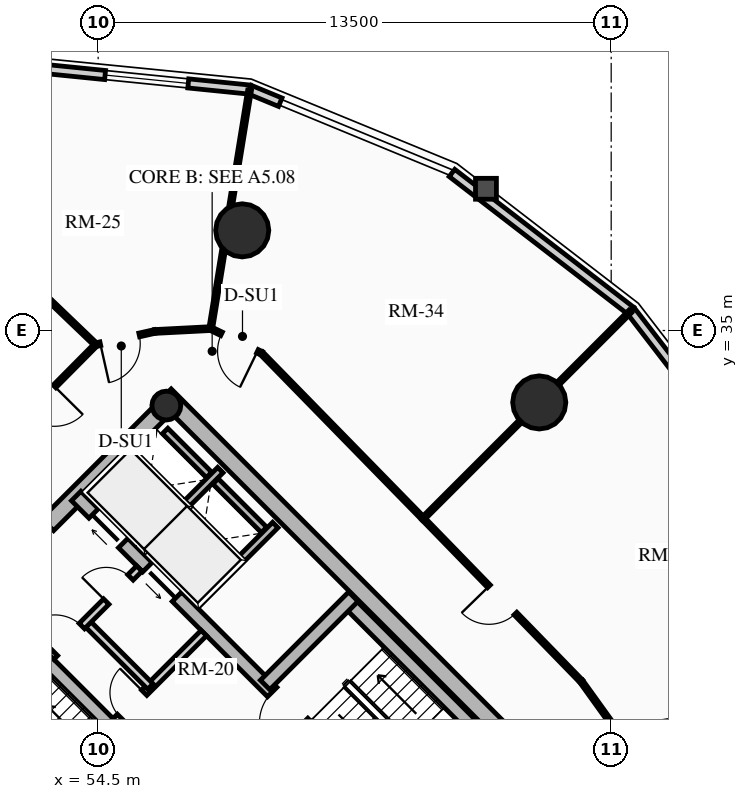
"""IFC4 building model, lengths in metres.
Left out: names, types, materials, properties, quantities, classifications, styles, units other than length and angle.
Written with IfcOpenShell. Run it as: python <this file> out.ifc"""

import sys

from ifc_helpers import new_model, si_unit, direction, frame, frame_2d, origin, origin_2d, place, context, subcontext, project, spatial, rectangle, circle, hollow_circle, extrude, source, transform, mapped, element, fill, save


model = new_model("IFC4")
c1 = context("Model", 3, precision=1e-05, world=origin(), true_north=direction((0.0, 1.0)))
c2 = subcontext(c1, "Body", "Model", "MODEL_VIEW")
j1 = project(units=[si_unit("LENGTHUNIT", "METRE"), si_unit("PLANEANGLEUNIT", "RADIAN")], contexts=[c1])
p1 = place(None, origin())
s1 = spatial("IfcSite", under=j1, at=p1, CompositionType="ELEMENT")
p2 = place(p1, origin())
s2 = spatial("IfcBuilding", under=s1, at=p2, CompositionType="ELEMENT")
p3 = place(p2, frame((0.0, 0.0, 99.25)))
s3 = spatial("IfcBuildingStorey", under=s2, at=p3, CompositionType="ELEMENT", Elevation=99.25)
for number, where, z_axis, x_axis in (
    (1, (58.737, 15.697, 0.0), (0.0, 0.0, 1.0), (-0.707, 0.707, 0.0)),
    (2, (66.303, 23.263, 0.0), (0.0, 0.0, 1.0), (-0.707, 0.707, 0.0)),
):
    element("IfcWall", number, at=place(p3, frame(where, z_axis=z_axis, x_axis=x_axis)), inside=s3, PredefinedType="SHEAR", context=c2, shape_type="SweptSolid", body=[
        extrude(rectangle(XDim=14.2, YDim=0.45, at=frame_2d((7.1, 0.0))), origin(), (0.0, 0.0, 1.0), 2.91),
    ])
p4 = place(p3, frame((48.856, 25.578, 0.0), z_axis=(0.0, 0.0, 1.0), x_axis=(0.707106781187, 0.707106781187, 0.0)))
e3 = element("IfcWall", 3, at=p4, inside=s3, PredefinedType="SHEAR", context=c2, shape_type="SweptSolid", body=[
    extrude(rectangle(XDim=10.7, YDim=0.45, at=frame_2d((5.35, 0.0))), origin(), (0.0, 0.0, 1.0), 2.91),
])
m1 = source(origin(), c2, "Body", "SweptSolid", [
    extrude(rectangle(XDim=1.5, YDim=2.02, at=frame_2d((0.75, 1.01))), frame((0.0, 0.235, 0.0), z_axis=(0.0, -1.0, 0.0), x_axis=(1.0, 0.0, 0.0)), (0.0, 0.0, 1.0), 0.47),
])
p5 = place(p4, frame((4.6, 0.0, 0.0)))
e4 = element("IfcOpeningElement", 4, at=p5, cuts=e3, PredefinedType="OPENING", context=c2, shape_type="MappedRepresentation", body=[
    mapped(m1, transform((0.0, 0.0, 0.0), x_axis=(1.0, 0.0, 0.0), y_axis=(0.0, 1.0, 0.0), z_axis=(0.0, 0.0, 1.0), scale=1.0)),
])
p6 = place(p3, frame((61.078, 18.355, 0.0), z_axis=(0.0, 0.0, 1.0), x_axis=(-0.707106781187, 0.707106781187, 0.0)))
e5 = element("IfcWall", 5, at=p6, inside=s3, PredefinedType="SHEAR", context=c2, shape_type="SweptSolid", body=[
    extrude(rectangle(XDim=13.75, YDim=0.35, at=frame_2d((6.875, 0.0))), origin(), (0.0, 0.0, 1.0), 2.91),
])
m2 = source(origin(), c2, "Body", "SweptSolid", [
    extrude(rectangle(XDim=1.1, YDim=2.015, at=frame_2d((0.55, 1.007))), frame((0.0, 0.185, 0.0), z_axis=(0.0, -1.0, 0.0), x_axis=(1.0, 0.0, 0.0)), (0.0, 0.0, 1.0), 0.37),
])
p7 = place(p6, frame((4.875, 0.0, 0.0)))
e6 = element("IfcOpeningElement", 6, at=p7, cuts=e5, PredefinedType="OPENING", context=c2, shape_type="MappedRepresentation", body=[
    mapped(m2, transform((0.0, 0.0, 0.0), x_axis=(1.0, 0.0, 0.0), y_axis=(0.0, 1.0, 0.0), z_axis=(0.0, 0.0, 1.0), scale=1.0)),
])
m3 = source(origin(), c2, "Body", "SweptSolid", [
    extrude(rectangle(XDim=1.15, YDim=2.02, at=frame_2d((0.575, 1.01))), frame((0.0, 0.185, 0.0), z_axis=(0.0, -1.0, 0.0), x_axis=(1.0, 0.0, 0.0)), (0.0, 0.0, 1.0), 0.37),
])
p8 = place(p6, frame((7.295, 0.0, 0.0)))
e7 = element("IfcOpeningElement", 7, at=p8, cuts=e5, PredefinedType="OPENING", context=c2, shape_type="MappedRepresentation", body=[
    mapped(m3, transform((0.0, 0.0, 0.0), x_axis=(1.0, 0.0, 0.0), y_axis=(0.0, 1.0, 0.0), z_axis=(0.0, 0.0, 1.0), scale=1.0)),
])
p9 = place(p3, frame((63.645, 20.922, 0.0), z_axis=(0.0, 0.0, 1.0), x_axis=(-0.707106781187, 0.707106781187, 0.0)))
e8 = element("IfcWall", 8, at=p9, inside=s3, PredefinedType="SHEAR", context=c2, shape_type="SweptSolid", body=[
    extrude(rectangle(XDim=13.75, YDim=0.35, at=frame_2d((6.875, 0.0))), origin(), (0.0, 0.0, 1.0), 2.91),
])
p10 = place(p9, frame((10.0, 0.0, 0.0)))
e9 = element("IfcOpeningElement", 9, at=p10, cuts=e8, PredefinedType="OPENING", context=c2, shape_type="MappedRepresentation", body=[
    mapped(m2, transform((0.0, 0.0, 0.0), x_axis=(1.0, 0.0, 0.0), y_axis=(0.0, 1.0, 0.0), z_axis=(0.0, 0.0, 1.0), scale=1.0)),
])
p11 = place(p9, frame((12.0, 0.0, 0.0)))
e10 = element("IfcOpeningElement", 10, at=p11, cuts=e8, PredefinedType="OPENING", context=c2, shape_type="MappedRepresentation", body=[
    mapped(m2, transform((0.0, 0.0, 0.0), x_axis=(1.0, 0.0, 0.0), y_axis=(0.0, 1.0, 0.0), z_axis=(0.0, 0.0, 1.0), scale=1.0)),
])
p12 = place(p9, frame((5.305, 0.0, 0.0)))
e11 = element("IfcOpeningElement", 11, at=p12, cuts=e8, PredefinedType="OPENING", context=c2, shape_type="MappedRepresentation", body=[
    mapped(m3, transform((0.0, 0.0, 0.0), x_axis=(1.0, 0.0, 0.0), y_axis=(0.0, 1.0, 0.0), z_axis=(0.0, 0.0, 1.0), scale=1.0)),
])
for number, where, z_axis, x_axis in (
    (12, (53.922, 21.141, 0.0), (0.0, 0.0, 1.0), (-0.707, 0.707, 0.0)),
    (13, (65.83, 23.107, 0.0), (0.0, 0.0, 1.0), (-0.707, 0.707, 0.0)),
):
    element("IfcWall", number, at=place(p3, frame(where, z_axis=z_axis, x_axis=x_axis)), inside=s3, PredefinedType="SHEAR", context=c2, shape_type="SweptSolid", body=[
        extrude(rectangle(XDim=6.72, YDim=0.35, at=frame_2d((3.36, 0.0))), origin(), (0.0, 0.0, 1.0), 2.91),
    ])
p13 = place(p3, frame((58.893, 25.674, 0.0), z_axis=(0.0, 0.0, 1.0), x_axis=(0.707106781187, 0.707106781187, 0.0)))
e14 = element("IfcWall", 14, at=p13, inside=s3, PredefinedType="SHEAR", context=c2, shape_type="SweptSolid", body=[
    extrude(rectangle(XDim=3.285, YDim=0.35, at=frame_2d((1.643, 0.0))), origin(), (0.0, 0.0, 1.0), 2.91),
])
p14 = place(p3, frame((56.294, 33.024, 0.0), z_axis=(0.0, 0.0, 1.0), x_axis=(0.707106781187, 0.707106781187, 0.0)))
e15 = element("IfcColumn", 15, at=p14, inside=s3, PredefinedType="COLUMN", context=c2, shape_type="SweptSolid", body=[
    extrude(hollow_circle(Radius=0.38, WallThickness=0.032, at=origin_2d()), origin(), (0.0, 0.0, 1.0), 2.91),
])
for number, where, z_axis, x_axis in (
    (16, (66.107, 33.107, 0.0), (0.0, 0.0, 1.0), (1.0, 0.0, 0.0)),
    (17, (58.291, 37.635, 0.0), (0.0, 0.0, 1.0), (1.0, 0.0, 0.0)),
):
    element("IfcColumn", number, at=place(p3, frame(where, z_axis=z_axis, x_axis=x_axis)), inside=s3, PredefinedType="USERDEFINED", context=c2, shape_type="SweptSolid", body=[
        extrude(circle(Radius=0.7, at=origin_2d()), origin(), (0.0, 0.0, 1.0), 2.91),
    ])
p15 = place(p3, frame((63.811, 39.145, 0.0), z_axis=(0.0, 0.0, 1.0), x_axis=(0.791982052206, -0.61054437102, 0.0)))
e18 = element("IfcWall", 18, at=p15, inside=s3, PredefinedType="SOLIDWALL", context=c2, shape_type="SweptSolid", body=[
    extrude(rectangle(XDim=5.942, YDim=0.24, at=frame_2d((2.971, 0.0))), origin(), (0.0, 0.0, 1.0), 2.179),
])
p16 = place(p3, frame((58.487, 41.339, 0.0), z_axis=(0.0, 0.0, 1.0), x_axis=(0.924556017656, -0.381046152345, 0.0)))
e19 = element("IfcWall", 19, at=p16, inside=s3, PredefinedType="SOLIDWALL", context=c2, shape_type="SweptSolid", body=[
    extrude(rectangle(XDim=0.87, YDim=0.24, at=frame_2d((0.435, 0.0))), origin(), (0.0, 0.0, 1.0), 2.179),
])
p17 = place(p3, frame((53.067, 41.885, 0.0), z_axis=(0.0, 0.0, 1.0), x_axis=(0.994971754311, -0.10015591906, 0.0)))
e20 = element("IfcWall", 20, at=p17, inside=s3, PredefinedType="SOLIDWALL", context=c2, shape_type="SweptSolid", body=[
    extrude(rectangle(XDim=5.448, YDim=0.24, at=frame_2d((2.724, 0.0))), origin(), (0.0, 0.0, 1.0), 2.179),
])
m4 = source(origin(), c2, "Body", "SweptSolid", [
    extrude(rectangle(XDim=2.2, YDim=1.35, at=frame_2d((1.1, 0.675))), frame((0.0, 0.13, 0.0), z_axis=(0.0, -1.0, 0.0), x_axis=(1.0, 0.0, 0.0)), (0.0, 0.0, 1.0), 0.26),
])
p18 = place(p17, frame((1.624, 0.0, 0.65)))
e21 = element("IfcOpeningElement", 21, at=p18, cuts=e20, PredefinedType="OPENING", context=c2, shape_type="MappedRepresentation", body=[
    mapped(m4, transform((0.0, 0.0, 0.0), x_axis=(1.0, 0.0, 0.0), y_axis=(0.0, 1.0, 0.0), z_axis=(0.0, 0.0, 1.0), scale=1.0)),
])
p19 = place(p3, frame((68.517, 35.517, 0.0), z_axis=(0.0, 0.0, 1.0), x_axis=(0.61054437102, -0.791982052206, 0.0)))
e22 = element("IfcWall", 22, at=p19, inside=s3, PredefinedType="SOLIDWALL", context=c2, shape_type="SweptSolid", body=[
    extrude(rectangle(XDim=5.942, YDim=0.24, at=frame_2d((2.971, 0.0))), origin(), (0.0, 0.0, 1.0), 2.179),
])
m5 = source(origin(), c2, "Body", "SweptSolid", [
    extrude(rectangle(XDim=1.9, YDim=1.35, at=frame_2d((0.95, 0.675))), frame((0.0, 0.13, 0.0), z_axis=(0.0, -1.0, 0.0), x_axis=(1.0, 0.0, 0.0)), (0.0, 0.0, 1.0), 0.26),
])
p20 = place(p19, frame((2.021, 0.0, 0.65)))
e23 = element("IfcOpeningElement", 23, at=p20, cuts=e22, PredefinedType="OPENING", context=c2, shape_type="MappedRepresentation", body=[
    mapped(m5, transform((0.0, 0.0, 0.0), x_axis=(1.0, 0.0, 0.0), y_axis=(0.0, 1.0, 0.0), z_axis=(0.0, 0.0, 1.0), scale=1.0)),
])
p21 = place(p3, frame((57.062, 27.781, 0.0), z_axis=(0.0, 0.0, 1.0), x_axis=(0.707106781187, 0.707106781187, 0.0)))
e24 = element("IfcWall", 24, at=p21, inside=s3, PredefinedType="SHEAR", context=c2, shape_type="SweptSolid", body=[
    extrude(rectangle(XDim=2.97, YDim=0.2, at=frame_2d((1.485, 0.0))), origin(), (0.0, 0.0, 1.0), 2.91),
])
p22 = place(p3, frame((55.615, 29.227, 0.0), z_axis=(0.0, 0.0, 1.0), x_axis=(0.707147878904, 0.70706568108, 0.0)))
e25 = element("IfcWall", 25, at=p22, inside=s3, PredefinedType="SHEAR", context=c2, shape_type="SweptSolid", body=[
    extrude(rectangle(XDim=2.97, YDim=0.2, at=frame_2d((1.485, 0.0))), origin(), (0.0, 0.0, 1.0), 2.91),
])
p23 = place(p3, frame((58.865, 29.754, 0.0), z_axis=(0.0, 0.0, 1.0), x_axis=(-0.707174411312, 0.707039144592, 0.0)))
e26 = element("IfcWall", 26, at=p23, inside=s3, PredefinedType="SHEAR", context=c2, shape_type="SweptSolid", body=[
    extrude(rectangle(XDim=1.805, YDim=0.2, at=frame_2d((0.902, 0.0))), origin(), (0.0, 0.0, 1.0), 2.91),
])
p24 = place(p3, frame((57.419, 31.2, 0.0), z_axis=(0.0, 0.0, 1.0), x_axis=(-0.707032117043, 0.707181437447, 0.0)))
e27 = element("IfcWall", 27, at=p24, inside=s3, PredefinedType="SHEAR", context=c2, shape_type="SweptSolid", body=[
    extrude(rectangle(XDim=1.635, YDim=0.2, at=frame_2d((0.817, 0.0))), origin(), (0.0, 0.0, 1.0), 2.91),
])
p25 = place(p3, frame((54.961, 24.719, 0.0), z_axis=(0.0, 0.0, 1.0), x_axis=(0.707106781187, 0.707106781187, 0.0)))
e28 = element("IfcWall", 28, at=p25, inside=s3, PredefinedType="PARTITIONING", context=c2, shape_type="SweptSolid", body=[
    extrude(rectangle(XDim=3.28, YDim=0.2, at=frame_2d((1.64, 0.0))), origin(), (0.0, 0.0, 1.0), 2.655),
])
m6 = source(origin(), c2, "Body", "SweptSolid", [
    extrude(rectangle(XDim=0.9, YDim=2.005, at=frame_2d((0.45, 1.002))), frame((0.0, 0.11, 0.0), z_axis=(0.0, -1.0, 0.0), x_axis=(1.0, 0.0, 0.0)), (0.0, 0.0, 1.0), 0.22),
])
p26 = place(p25, frame((0.16, 0.0, 0.0)))
e29 = element("IfcOpeningElement", 29, at=p26, cuts=e28, PredefinedType="OPENING", context=c2, shape_type="MappedRepresentation", body=[
    mapped(m6, transform((0.0, 0.0, 0.0), x_axis=(1.0, 0.0, 0.0), y_axis=(0.0, 1.0, 0.0), z_axis=(0.0, 0.0, 1.0), scale=1.0)),
])
p27 = place(p3, frame((55.874, 25.631, 0.0), z_axis=(0.0, 0.0, 1.0), x_axis=(-0.707157639372, 0.707055919343, 0.0)))
e30 = element("IfcWall", 30, at=p27, inside=s3, PredefinedType="PARTITIONING", context=c2, shape_type="SweptSolid", body=[
    extrude(rectangle(XDim=2.4, YDim=0.2, at=frame_2d((1.2, 0.0))), origin(), (0.0, 0.0, 1.0), 2.655),
])
p28 = place(p3, frame((53.264, 26.416, 0.0), z_axis=(0.0, 0.0, 1.0), x_axis=(0.707106781187, 0.707106781187, 0.0)))
e31 = element("IfcWall", 31, at=p28, inside=s3, PredefinedType="PARTITIONING", context=c2, shape_type="SweptSolid", body=[
    extrude(rectangle(XDim=3.28, YDim=0.2, at=frame_2d((1.64, 0.0))), origin(), (0.0, 0.0, 1.0), 2.655),
])
m7 = source(origin(), c2, "Body", "SweptSolid", [
    extrude(rectangle(XDim=1.0, YDim=2.015, at=frame_2d((0.5, 1.007))), frame((0.0, 0.11, 0.0), z_axis=(0.0, -1.0, 0.0), x_axis=(1.0, 0.0, 0.0)), (0.0, 0.0, 1.0), 0.22),
])
p29 = place(p28, frame((0.14, 0.0, 0.0)))
e32 = element("IfcOpeningElement", 32, at=p29, cuts=e31, PredefinedType="OPENING", context=c2, shape_type="MappedRepresentation", body=[
    mapped(m7, transform((0.0, 0.0, 0.0), x_axis=(1.0, 0.0, 0.0), y_axis=(0.0, 1.0, 0.0), z_axis=(0.0, 0.0, 1.0), scale=1.0)),
])
p30 = place(p28, frame((2.05, 0.0, 0.0)))
e33 = element("IfcOpeningElement", 33, at=p30, cuts=e31, PredefinedType="OPENING", context=c2, shape_type="MappedRepresentation", body=[
    mapped(m6, transform((0.0, 0.0, 0.0), x_axis=(1.0, 0.0, 0.0), y_axis=(0.0, 1.0, 0.0), z_axis=(0.0, 0.0, 1.0), scale=1.0)),
])
p31 = place(p3, frame((63.051, 30.051, 0.0), z_axis=(0.0, 0.0, 1.0), x_axis=(-0.698911483116, 0.715208178622, 0.0)))
e34 = element("IfcWall", 34, at=p31, inside=s3, PredefinedType="MOVABLE", context=c2, shape_type="SweptSolid", body=[
    extrude(rectangle(XDim=6.082, YDim=0.1, at=frame_2d((3.041, 0.0))), origin(), (0.0, 0.0, 1.0), 2.225),
])
p32 = place(p3, frame((58.8, 34.401, 0.0), z_axis=(0.0, 0.0, 1.0), x_axis=(-0.899620612635, 0.436672363818, 0.0)))
e35 = element("IfcWall", 35, at=p32, inside=s3, PredefinedType="MOVABLE", context=c2, shape_type="SweptSolid", body=[
    extrude(rectangle(XDim=1.487, YDim=0.1, at=frame_2d((0.743, 0.0))), origin(), (0.0, 0.0, 1.0), 2.225),
])
m8 = source(origin(), c2, "Body", "SweptSolid", [
    extrude(rectangle(XDim=1.05, YDim=2.015, at=frame_2d((0.525, 1.007))), frame((0.0, 0.06, 0.0), z_axis=(0.0, -1.0, 0.0), x_axis=(1.0, 0.0, 0.0)), (0.0, 0.0, 1.0), 0.12),
])
p33 = place(p32, frame((0.12, 0.0, 0.0)))
e36 = element("IfcOpeningElement", 36, at=p33, cuts=e35, PredefinedType="OPENING", context=c2, shape_type="MappedRepresentation", body=[
    mapped(m8, transform((0.0, 0.0, 0.0), x_axis=(1.0, 0.0, 0.0), y_axis=(0.0, 1.0, 0.0), z_axis=(0.0, 0.0, 1.0), scale=1.0)),
])
p34 = place(p3, frame((57.462, 35.05, 0.0), z_axis=(0.0, 0.0, 1.0), x_axis=(-0.998677016607, -0.051421945723, 0.0)))
e37 = element("IfcWall", 37, at=p34, inside=s3, PredefinedType="MOVABLE", context=c2, shape_type="SweptSolid", body=[
    extrude(rectangle(XDim=1.477, YDim=0.1, at=frame_2d((0.738, 0.0))), origin(), (0.0, 0.0, 1.0), 2.225),
])
p35 = place(p3, frame((55.988, 34.974, 0.0), z_axis=(0.0, 0.0, 1.0), x_axis=(-0.975666565154, -0.219259557695, 0.0)))
e38 = element("IfcWall", 38, at=p35, inside=s3, PredefinedType="MOVABLE", context=c2, shape_type="SweptSolid", body=[
    extrude(rectangle(XDim=1.587, YDim=0.1, at=frame_2d((0.793, 0.0))), origin(), (0.0, 0.0, 1.0), 2.225),
])
p36 = place(p35, frame((0.417, 0.0, 0.0)))
e39 = element("IfcOpeningElement", 39, at=p36, cuts=e38, PredefinedType="OPENING", context=c2, shape_type="MappedRepresentation", body=[
    mapped(m8, transform((0.0, 0.0, 0.0), x_axis=(1.0, 0.0, 0.0), y_axis=(0.0, 1.0, 0.0), z_axis=(0.0, 0.0, 1.0), scale=1.0)),
])
p37 = place(p3, frame((54.44, 34.626, 0.0), z_axis=(0.0, 0.0, 1.0), x_axis=(-0.703978840546, -0.710220945948, 0.0)))
e40 = element("IfcWall", 40, at=p37, inside=s3, PredefinedType="MOVABLE", context=c2, shape_type="SweptSolid", body=[
    extrude(rectangle(XDim=3.364, YDim=0.1, at=frame_2d((1.682, 0.0))), origin(), (0.0, 0.0, 1.0), 2.225),
])
p38 = place(p37, frame((1.546, 0.0, 0.0)))
e41 = element("IfcOpeningElement", 41, at=p38, cuts=e40, PredefinedType="OPENING", context=c2, shape_type="MappedRepresentation", body=[
    mapped(m8, transform((0.0, 0.0, 0.0), x_axis=(1.0, 0.0, 0.0), y_axis=(0.0, 1.0, 0.0), z_axis=(0.0, 0.0, 1.0), scale=1.0)),
])
p39 = place(p3, frame((68.15, 24.465, 0.0), z_axis=(0.0, 0.0, 1.0), x_axis=(-0.58376767291, 0.811920749868, 0.0)))
e42 = element("IfcWall", 42, at=p39, inside=s3, PredefinedType="MOVABLE", context=c2, shape_type="SweptSolid", body=[
    extrude(rectangle(XDim=1.605, YDim=0.1, at=frame_2d((0.803, 0.0))), origin(), (0.0, 0.0, 1.0), 2.225),
])
p40 = place(p3, frame((67.213, 25.768, 0.0), z_axis=(0.0, 0.0, 1.0), x_axis=(-0.696916079748, 0.717152687918, 0.0)))
e43 = element("IfcWall", 43, at=p40, inside=s3, PredefinedType="MOVABLE", context=c2, shape_type="SweptSolid", body=[
    extrude(rectangle(XDim=5.972, YDim=0.1, at=frame_2d((2.986, 0.0))), origin(), (0.0, 0.0, 1.0), 2.655),
])
m9 = source(origin(), c2, "Body", "SweptSolid", [
    extrude(rectangle(XDim=1.0, YDim=2.015, at=frame_2d((0.5, 1.007))), frame((0.0, 0.06, 0.0), z_axis=(0.0, -1.0, 0.0), x_axis=(1.0, 0.0, 0.0)), (0.0, 0.0, 1.0), 0.12),
])
p41 = place(p40, frame((2.486, 0.0, 0.0)))
e44 = element("IfcOpeningElement", 44, at=p41, cuts=e43, PredefinedType="OPENING", context=c2, shape_type="MappedRepresentation", body=[
    mapped(m9, transform((0.0, 0.0, 0.0), x_axis=(1.0, 0.0, 0.0), y_axis=(0.0, 1.0, 0.0), z_axis=(0.0, 0.0, 1.0), scale=1.0)),
])
p42 = place(p3, frame((63.051, 30.051, 0.0), z_axis=(0.0, 0.0, 1.0), x_axis=(0.707106781187, 0.707106781187, 0.0)))
e45 = element("IfcWall", 45, at=p42, inside=s3, PredefinedType="MOVABLE", context=c2, shape_type="SweptSolid", body=[
    extrude(rectangle(XDim=7.711, YDim=0.1, at=frame_2d((3.855, 0.0))), origin(), (0.0, 0.0, 1.0), 2.179),
])
p43 = place(p3, frame((57.462, 35.05, 0.0), z_axis=(0.0, 0.0, 1.0), x_axis=(0.160845392798, 0.98697961459, 0.0)))
e46 = element("IfcWall", 46, at=p43, inside=s3, PredefinedType="MOVABLE", context=c2, shape_type="SweptSolid", body=[
    extrude(rectangle(XDim=6.352, YDim=0.1, at=frame_2d((3.176, 0.0))), origin(), (0.0, 0.0, 1.0), 2.179),
])
p44 = place(p3, frame((54.44, 34.626, 0.0), z_axis=(0.0, 0.0, 1.0), x_axis=(-0.722045979822, 0.691845071547, 0.0)))
e47 = element("IfcWall", 47, at=p44, inside=s3, PredefinedType="MOVABLE", context=c2, shape_type="SweptSolid", body=[
    extrude(rectangle(XDim=8.795, YDim=0.1, at=frame_2d((4.397, 0.0))), origin(), (0.0, 0.0, 1.0), 2.179),
])
p45 = place(p3, frame((68.15, 24.465, 0.0), z_axis=(0.0, 0.0, 1.0), x_axis=(0.986627164528, 0.162993368625, 0.0)))
e48 = element("IfcWall", 48, at=p45, inside=s3, PredefinedType="MOVABLE", context=c2, shape_type="SweptSolid", body=[
    extrude(rectangle(XDim=6.254, YDim=0.1, at=frame_2d((3.127, 0.0))), origin(), (0.0, 0.0, 1.0), 2.179),
])
m10 = source(origin(), c2, "Body", "SweptSolid", [
    extrude(rectangle(XDim=2.2, YDim=1.35, at=frame_2d((1.1, 0.675))), frame((0.0, 0.03, 0.0), z_axis=(0.0, -1.0, 0.0), x_axis=(1.0, 0.0, 0.0)), (0.0, 0.0, 1.0), 0.06),
])
p46 = place(p18, origin())
e49 = element("IfcWindow", 49, at=p46, inside=s3, PartitioningType="DOUBLE_PANEL_VERTICAL", PredefinedType="WINDOW", context=c2, shape_type="MappedRepresentation", body=[
    mapped(m10, transform((0.0, 0.0, 0.0), x_axis=(1.0, 0.0, 0.0), y_axis=(0.0, 1.0, 0.0), z_axis=(0.0, 0.0, 1.0), scale=1.0)),
])
fill(e21, e49)
m11 = source(origin(), c2, "Body", "SweptSolid", [
    extrude(rectangle(XDim=1.1, YDim=2.015, at=frame_2d((0.55, 1.007))), frame((0.0, 0.025, 0.0), z_axis=(0.0, -1.0, 0.0), x_axis=(1.0, 0.0, 0.0)), (0.0, 0.0, 1.0), 0.05),
])
p47 = place(p10, origin())
e50 = element("IfcDoor", 50, at=p47, inside=s3, OperationType="SLIDING_TO_LEFT", PredefinedType="DOOR", context=c2, shape_type="MappedRepresentation", body=[
    mapped(m11, transform((0.0, 0.0, 0.0), x_axis=(1.0, 0.0, 0.0), y_axis=(0.0, 1.0, 0.0), z_axis=(0.0, 0.0, 1.0), scale=1.0)),
])
fill(e9, e50)
p48 = place(p11, origin())
e51 = element("IfcDoor", 51, at=p48, inside=s3, OperationType="SLIDING_TO_RIGHT", PredefinedType="DOOR", context=c2, shape_type="MappedRepresentation", body=[
    mapped(m11, transform((0.0, 0.0, 0.0), x_axis=(1.0, 0.0, 0.0), y_axis=(0.0, 1.0, 0.0), z_axis=(0.0, 0.0, 1.0), scale=1.0)),
])
fill(e10, e51)
m12 = source(origin(), c2, "Body", "SweptSolid", [
    extrude(rectangle(XDim=1.15, YDim=2.02, at=frame_2d((0.575, 1.01))), frame((0.0, 0.025, 0.0), z_axis=(0.0, -1.0, 0.0), x_axis=(1.0, 0.0, 0.0)), (0.0, 0.0, 1.0), 0.05),
])
p49 = place(p12, origin())
e52 = element("IfcDoor", 52, at=p49, inside=s3, OperationType="SINGLE_SWING_LEFT", PredefinedType="DOOR", context=c2, shape_type="MappedRepresentation", body=[
    mapped(m12, transform((0.0, 0.0, 0.0), x_axis=(1.0, 0.0, 0.0), y_axis=(0.0, 1.0, 0.0), z_axis=(0.0, 0.0, 1.0), scale=1.0)),
])
fill(e11, e52)
m13 = source(origin(), c2, "Body", "SweptSolid", [
    extrude(rectangle(XDim=0.9, YDim=2.005, at=frame_2d((0.45, 1.002))), frame((0.0, 0.025, 0.0), z_axis=(0.0, -1.0, 0.0), x_axis=(1.0, 0.0, 0.0)), (0.0, 0.0, 1.0), 0.05),
])
p50 = place(p26, origin())
e53 = element("IfcDoor", 53, at=p50, inside=s3, OperationType="SINGLE_SWING_RIGHT", PredefinedType="DOOR", context=c2, shape_type="MappedRepresentation", body=[
    mapped(m13, transform((0.0, 0.0, 0.0), x_axis=(1.0, 0.0, 0.0), y_axis=(0.0, 1.0, 0.0), z_axis=(0.0, 0.0, 1.0), scale=1.0)),
])
fill(e29, e53)
m14 = source(origin(), c2, "Body", "SweptSolid", [
    extrude(rectangle(XDim=1.0, YDim=2.015, at=frame_2d((0.5, 1.007))), frame((0.0, 0.025, 0.0), z_axis=(0.0, -1.0, 0.0), x_axis=(1.0, 0.0, 0.0)), (0.0, 0.0, 1.0), 0.05),
])
p51 = place(p29, origin())
e54 = element("IfcDoor", 54, at=p51, inside=s3, OperationType="SINGLE_SWING_LEFT", PredefinedType="DOOR", context=c2, shape_type="MappedRepresentation", body=[
    mapped(m14, transform((0.0, 0.0, 0.0), x_axis=(1.0, 0.0, 0.0), y_axis=(0.0, 1.0, 0.0), z_axis=(0.0, 0.0, 1.0), scale=1.0)),
])
fill(e32, e54)
p52 = place(p30, origin())
e55 = element("IfcDoor", 55, at=p52, inside=s3, OperationType="SINGLE_SWING_LEFT", PredefinedType="DOOR", context=c2, shape_type="MappedRepresentation", body=[
    mapped(m13, transform((0.0, 0.0, 0.0), x_axis=(1.0, 0.0, 0.0), y_axis=(0.0, 1.0, 0.0), z_axis=(0.0, 0.0, 1.0), scale=1.0)),
])
fill(e33, e55)
m15 = source(origin(), c2, "Body", "SweptSolid", [
    extrude(rectangle(XDim=1.05, YDim=2.015, at=frame_2d((0.525, 1.007))), frame((0.0, 0.025, 0.0), z_axis=(0.0, -1.0, 0.0), x_axis=(1.0, 0.0, 0.0)), (0.0, 0.0, 1.0), 0.05),
])
p53 = place(p36, origin())
e56 = element("IfcDoor", 56, at=p53, inside=s3, OperationType="SINGLE_SWING_RIGHT", PredefinedType="DOOR", context=c2, shape_type="MappedRepresentation", body=[
    mapped(m15, transform((0.0, 0.0, 0.0), x_axis=(1.0, 0.0, 0.0), y_axis=(0.0, 1.0, 0.0), z_axis=(0.0, 0.0, 1.0), scale=1.0)),
])
fill(e39, e56)
p54 = place(p38, origin())
e57 = element("IfcDoor", 57, at=p54, inside=s3, OperationType="SINGLE_SWING_LEFT", PredefinedType="DOOR", context=c2, shape_type="MappedRepresentation", body=[
    mapped(m15, transform((0.0, 0.0, 0.0), x_axis=(1.0, 0.0, 0.0), y_axis=(0.0, 1.0, 0.0), z_axis=(0.0, 0.0, 1.0), scale=1.0)),
])
fill(e41, e57)
p55 = place(p41, origin())
e58 = element("IfcDoor", 58, at=p55, inside=s3, OperationType="SINGLE_SWING_RIGHT", PredefinedType="DOOR", context=c2, shape_type="MappedRepresentation", body=[
    mapped(m14, transform((0.0, 0.0, 0.0), x_axis=(1.0, 0.0, 0.0), y_axis=(0.0, 1.0, 0.0), z_axis=(0.0, 0.0, 1.0), scale=1.0)),
])
fill(e44, e58)
p56 = place(p33, origin())
e59 = element("IfcDoor", 59, at=p56, inside=s3, OperationType="SINGLE_SWING_LEFT", PredefinedType="DOOR", context=c2, shape_type="MappedRepresentation", body=[
    mapped(m15, transform((0.0, 0.0, 0.0), x_axis=(1.0, 0.0, 0.0), y_axis=(0.0, 1.0, 0.0), z_axis=(0.0, 0.0, 1.0), scale=1.0)),
])
fill(e36, e59)
save(model, sys.argv[1])
